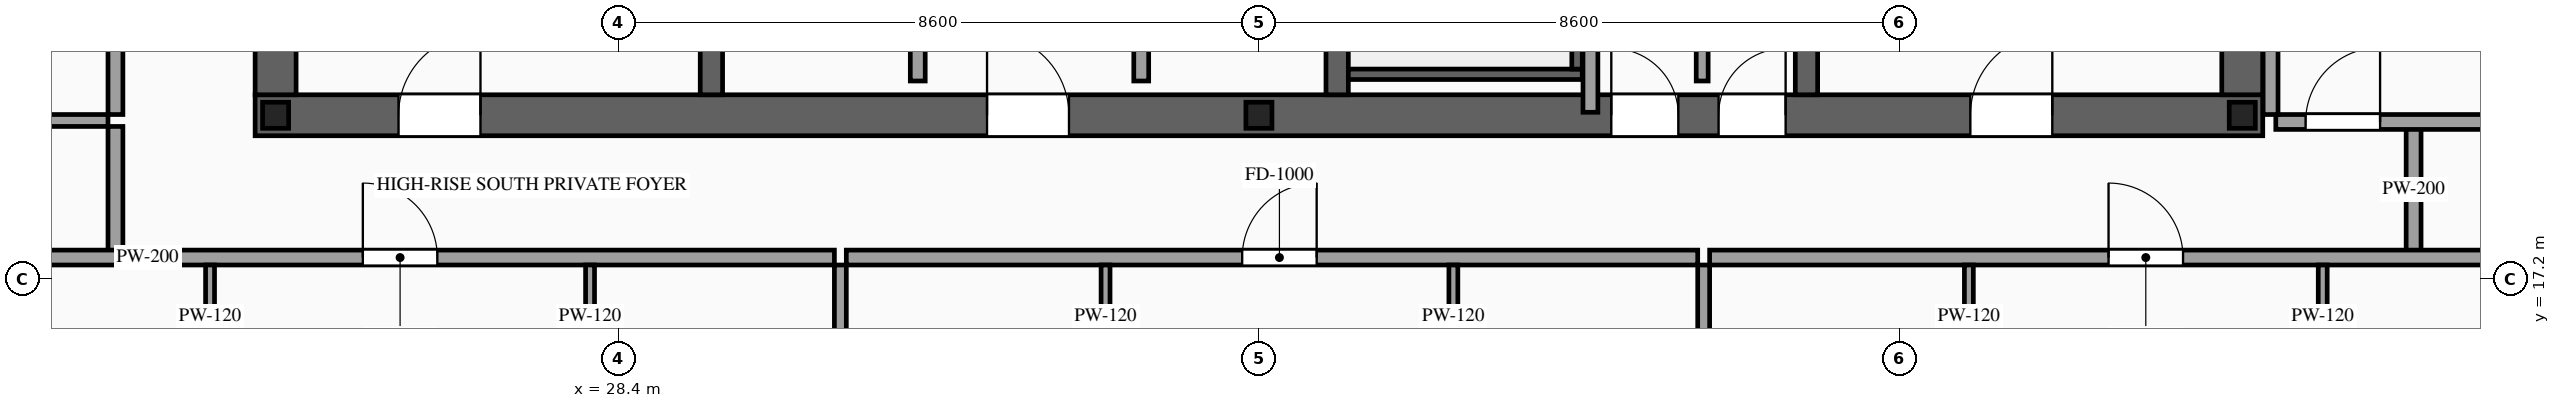
"""IFC4 building model, lengths in metres.
Left out: names, types, materials, properties, quantities, classifications, styles, units other than length and angle.
Written with IfcOpenShell. Run it as: python <this file> out.ifc"""

import sys

from ifc_helpers import new_model, si_unit, direction, frame, frame_2d, origin, origin_2d, place, context, subcontext, project, spatial, rectangle, i_section, extrude, source, transform, mapped, element, fill, save


model = new_model("IFC4")
c1 = context("Model", 3, precision=1e-05, world=origin(), true_north=direction((0.0, 1.0)))
c2 = subcontext(c1, "Body", "Model", "MODEL_VIEW")
j1 = project(units=[si_unit("LENGTHUNIT", "METRE"), si_unit("PLANEANGLEUNIT", "RADIAN")], contexts=[c1])
p1 = place(None, origin())
s1 = spatial("IfcSite", under=j1, at=p1, CompositionType="ELEMENT")
p2 = place(p1, origin())
s2 = spatial("IfcBuilding", under=s1, at=p2, CompositionType="ELEMENT")
p3 = place(p2, frame((0.0, 0.0, 275.1)))
s3 = spatial("IfcBuildingStorey", under=s2, at=p3, CompositionType="ELEMENT", Elevation=275.1)
p4 = place(p3, frame((23.525, 19.4, 0.0), z_axis=(0.0, 0.0, 1.0), x_axis=(1.0, 0.0, 0.0)))
e1 = element("IfcWall", 1, at=p4, inside=s3, PredefinedType="SHEAR", context=c2, shape_type="SweptSolid", body=[
    extrude(rectangle(XDim=26.95, YDim=0.55, at=frame_2d((13.475, 0.0))), origin(), (0.0, 0.0, 1.0), 3.5),
])
p5 = place(p4, frame((1.925, 0.0, 0.0)))
e2 = element("IfcOpeningElement", 2, at=p5, cuts=e1, PredefinedType="OPENING", context=c2, shape_type="SweptSolid", body=[
    extrude(rectangle(XDim=1.1, YDim=2.2, at=frame_2d((0.55, 1.1))), frame((0.0, 0.29, 0.0), z_axis=(0.0, -1.0, 0.0), x_axis=(1.0, 0.0, 0.0)), (0.0, 0.0, 1.0), 0.58),
])
p6 = place(p4, frame((9.825, 0.0, 0.0)))
e3 = element("IfcOpeningElement", 3, at=p6, cuts=e1, PredefinedType="OPENING", context=c2, shape_type="SweptSolid", body=[
    extrude(rectangle(XDim=1.1, YDim=2.2, at=frame_2d((0.55, 1.1))), frame((0.0, 0.29, 0.0), z_axis=(0.0, -1.0, 0.0), x_axis=(1.0, 0.0, 0.0)), (0.0, 0.0, 1.0), 0.58),
])
p7 = place(p4, frame((23.025, 0.0, 0.0)))
e4 = element("IfcOpeningElement", 4, at=p7, cuts=e1, PredefinedType="OPENING", context=c2, shape_type="SweptSolid", body=[
    extrude(rectangle(XDim=1.1, YDim=2.2, at=frame_2d((0.55, 1.1))), frame((0.0, 0.29, 0.0), z_axis=(0.0, -1.0, 0.0), x_axis=(1.0, 0.0, 0.0)), (0.0, 0.0, 1.0), 0.58),
])
p8 = place(p4, frame((19.645, 0.0, 0.0)))
e5 = element("IfcOpeningElement", 5, at=p8, cuts=e1, PredefinedType="OPENING", context=c2, shape_type="SweptSolid", body=[
    extrude(rectangle(XDim=0.9, YDim=2.15, at=frame_2d((0.45, 1.075))), frame((0.0, 0.29, 0.0), z_axis=(0.0, -1.0, 0.0), x_axis=(1.0, 0.0, 0.0)), (0.0, 0.0, 1.0), 0.58),
])
p9 = place(p4, frame((18.205, 0.0, 0.0)))
e6 = element("IfcOpeningElement", 6, at=p9, cuts=e1, PredefinedType="OPENING", context=c2, shape_type="SweptSolid", body=[
    extrude(rectangle(XDim=0.9, YDim=2.15, at=frame_2d((0.45, 1.075))), frame((0.0, 0.29, 0.0), z_axis=(0.0, -1.0, 0.0), x_axis=(1.0, 0.0, 0.0)), (0.0, 0.0, 1.0), 0.58),
])
m1 = source(origin(), c2, "Body", "SweptSolid", [
    extrude(rectangle(XDim=12.25, YDim=0.55, at=frame_2d((6.125, 0.0))), origin(), (0.0, 0.0, 1.0), 3.5),
])
for number, where, z_axis, x_axis in (
    (7, (23.8, 19.675, 0.0), (0.0, 0.0, 1.0), (0.0, 1.0, 0.0)),
    (8, (50.2, 19.675, 0.0), (0.0, 0.0, 1.0), (0.0, 1.0, 0.0)),
):
    element("IfcWall", number, at=place(p3, frame(where, z_axis=z_axis, x_axis=x_axis)), inside=s3, PredefinedType="SHEAR", context=c2, shape_type="MappedRepresentation", body=[
        mapped(m1, transform((0.0, 0.0, 0.0), scale=1.0)),
    ])
m2 = source(origin(), c2, "Body", "SweptSolid", [
    extrude(rectangle(XDim=12.25, YDim=0.3, at=frame_2d((6.125, 0.0))), origin(), (0.0, 0.0, 1.0), 3.5),
])
for number, where, z_axis, x_axis in (
    (9, (29.65, 19.675, 0.0), (0.0, 0.0, 1.0), (0.0, 1.0, 0.0)),
    (10, (38.05, 19.675, 0.0), (0.0, 0.0, 1.0), (0.0, 1.0, 0.0)),
):
    element("IfcWall", number, at=place(p3, frame(where, z_axis=z_axis, x_axis=x_axis)), inside=s3, PredefinedType="SOLIDWALL", context=c2, shape_type="MappedRepresentation", body=[
        mapped(m2, transform((0.0, 0.0, 0.0), scale=1.0)),
    ])
p10 = place(p3, frame((44.35, 19.675, 0.0), z_axis=(0.0, 0.0, 1.0), x_axis=(0.0, 1.0, 0.0)))
e11 = element("IfcWall", 11, at=p10, inside=s3, PredefinedType="SOLIDWALL", context=c2, shape_type="SweptSolid", body=[
    extrude(rectangle(XDim=12.25, YDim=0.3, at=frame_2d((6.125, 0.0))), origin(), (0.0, 0.0, 1.0), 3.5),
])
p11 = place(p10, frame((6.525, 0.0, 0.0)))
e12 = element("IfcOpeningElement", 12, at=p11, cuts=e11, PredefinedType="OPENING", context=c2, shape_type="SweptSolid", body=[
    extrude(rectangle(XDim=1.1, YDim=2.2, at=frame_2d((0.55, 1.1))), frame((0.0, 0.165, 0.0), z_axis=(0.0, -1.0, 0.0), x_axis=(1.0, 0.0, 0.0)), (0.0, 0.0, 1.0), 0.33),
])
p12 = place(p10, frame((8.625, 0.0, 0.0)))
e13 = element("IfcOpeningElement", 13, at=p12, cuts=e11, PredefinedType="OPENING", context=c2, shape_type="SweptSolid", body=[
    extrude(rectangle(XDim=1.1, YDim=2.2, at=frame_2d((0.55, 1.1))), frame((0.0, 0.165, 0.0), z_axis=(0.0, -1.0, 0.0), x_axis=(1.0, 0.0, 0.0)), (0.0, 0.0, 1.0), 0.33),
])
p13 = place(p10, frame((10.725, 0.0, 0.0)))
e14 = element("IfcOpeningElement", 14, at=p13, cuts=e11, PredefinedType="OPENING", context=c2, shape_type="SweptSolid", body=[
    extrude(rectangle(XDim=1.1, YDim=2.2, at=frame_2d((0.55, 1.1))), frame((0.0, 0.165, 0.0), z_axis=(0.0, -1.0, 0.0), x_axis=(1.0, 0.0, 0.0)), (0.0, 0.0, 1.0), 0.33),
])
m3 = source(origin(), c2, "Body", "SweptSolid", [
    extrude(i_section(OverallWidth=0.35, OverallDepth=0.35, WebThickness=0.012, FlangeThickness=0.019, at=origin_2d()), origin(), (0.0, 0.0, 1.0), 3.5),
])
for number, where, z_axis, x_axis in (
    (15, (23.8, 19.4, 0.0), (0.0, 0.0, 1.0), (1.0, 0.0, 0.0)),
    (16, (37.0, 19.4, 0.0), (0.0, 0.0, 1.0), (1.0, 0.0, 0.0)),
    (17, (50.2, 19.4, 0.0), (0.0, 0.0, 1.0), (1.0, 0.0, 0.0)),
):
    element("IfcColumn", number, at=place(p3, frame(where, z_axis=z_axis, x_axis=x_axis)), inside=s3, PredefinedType="COLUMN", context=c2, shape_type="MappedRepresentation", body=[
        mapped(m3, transform((0.0, 0.0, 0.0), scale=1.0)),
    ])
m4 = source(origin(), c2, "Body", "SweptSolid", [
    extrude(rectangle(XDim=3.14, YDim=0.14, at=frame_2d((1.57, 0.0))), origin(), (0.0, 0.0, 1.0), 3.28),
])
p14 = place(p3, frame((38.2, 19.95, 0.0), z_axis=(0.0, 0.0, 1.0), x_axis=(1.0, 0.0, 0.0)))
e18 = element("IfcWall", 18, at=p14, inside=s3, PredefinedType="SOLIDWALL", context=c2, shape_type="MappedRepresentation", body=[
    mapped(m4, transform((0.0, 0.0, 0.0), scale=1.0)),
])
m5 = source(origin(), c2, "Body", "SweptSolid", [
    extrude(rectangle(XDim=8.94, YDim=0.14, at=frame_2d((4.47, 0.0))), origin(), (0.0, 0.0, 1.0), 3.28),
])
p15 = place(p3, frame((41.27, 20.02, 0.0), z_axis=(0.0, 0.0, 1.0), x_axis=(0.0, 1.0, 0.0)))
e19 = element("IfcWall", 19, at=p15, inside=s3, PredefinedType="SOLIDWALL", context=c2, shape_type="MappedRepresentation", body=[
    mapped(m5, transform((0.0, 0.0, 0.0), scale=1.0)),
])
p16 = place(p3, frame((32.42, 19.86, 0.0), z_axis=(0.0, 0.0, 1.0), x_axis=(0.0, 1.0, 0.0)))
e20 = element("IfcWall", 20, at=p16, inside=s3, PredefinedType="PARTITIONING", context=c2, shape_type="SweptSolid", body=[
    extrude(rectangle(XDim=7.94, YDim=0.2, at=frame_2d((3.97, 0.0))), origin(), (0.0, 0.0, 1.0), 3.28),
])
p17 = place(p16, frame((3.52, 0.0, 0.0)))
e21 = element("IfcOpeningElement", 21, at=p17, cuts=e20, PredefinedType="OPENING", context=c2, shape_type="SweptSolid", body=[
    extrude(rectangle(XDim=0.9, YDim=2.15, at=frame_2d((0.45, 1.075))), frame((0.0, 0.115, 0.0), z_axis=(0.0, -1.0, 0.0), x_axis=(1.0, 0.0, 0.0)), (0.0, 0.0, 1.0), 0.23),
])
p18 = place(p3, frame((35.42, 19.86, 0.0), z_axis=(0.0, 0.0, 1.0), x_axis=(0.0, 1.0, 0.0)))
e22 = element("IfcWall", 22, at=p18, inside=s3, PredefinedType="PARTITIONING", context=c2, shape_type="SweptSolid", body=[
    extrude(rectangle(XDim=6.34, YDim=0.2, at=frame_2d((3.17, 0.0))), origin(), (0.0, 0.0, 1.0), 3.28),
])
p19 = place(p18, frame((2.72, 0.0, 0.0)))
e23 = element("IfcOpeningElement", 23, at=p19, cuts=e22, PredefinedType="OPENING", context=c2, shape_type="SweptSolid", body=[
    extrude(rectangle(XDim=0.9, YDim=2.15, at=frame_2d((0.45, 1.075))), frame((0.0, 0.115, 0.0), z_axis=(0.0, -1.0, 0.0), x_axis=(1.0, 0.0, 0.0)), (0.0, 0.0, 1.0), 0.23),
])
m6 = source(origin(), c2, "Body", "SweptSolid", [
    extrude(rectangle(XDim=1.34, YDim=0.16, at=frame_2d((0.67, 0.0))), origin(), (0.0, 0.0, 1.0), 3.28),
])
p20 = place(p3, frame((42.95, 19.86, 0.0), z_axis=(0.0, 0.0, 1.0), x_axis=(0.0, 1.0, 0.0)))
e24 = element("IfcWall", 24, at=p20, inside=s3, PredefinedType="PARTITIONING", context=c2, shape_type="MappedRepresentation", body=[
    mapped(m6, transform((0.0, 0.0, 0.0), scale=1.0)),
])
m7 = source(origin(), c2, "Body", "SweptSolid", [
    extrude(rectangle(XDim=6.06, YDim=0.2, at=frame_2d((3.03, 0.0))), origin(), (0.0, 0.0, 1.0), 3.28),
])
p21 = place(p3, frame((41.45, 19.44, 0.0), z_axis=(0.0, 0.0, 1.0), x_axis=(0.0, 1.0, 0.0)))
e25 = element("IfcWall", 25, at=p21, inside=s3, PredefinedType="PARTITIONING", context=c2, shape_type="MappedRepresentation", body=[
    mapped(m7, transform((0.0, 0.0, 0.0), scale=1.0)),
])
m8 = source(origin(), c2, "Body", "SweptSolid", [
    extrude(rectangle(XDim=1.7, YDim=0.2, at=frame_2d((0.85, 0.0))), origin(), (0.0, 0.0, 1.0), 3.28),
])
for number, where, z_axis, x_axis in (
    (26, (21.65, 17.55, 0.0), (0.0, 0.0, 1.0), (0.0, 1.0, 0.0)),
    (27, (52.5, 17.55, 0.0), (0.0, 0.0, 1.0), (0.0, 1.0, 0.0)),
):
    element("IfcWall", number, at=place(p3, frame(where, z_axis=z_axis, x_axis=x_axis)), inside=s3, PredefinedType="PARTITIONING", context=c2, shape_type="MappedRepresentation", body=[
        mapped(m8, transform((0.0, 0.0, 0.0), scale=1.0)),
    ])
p22 = place(p3, frame((19.44, 17.49, 0.0), z_axis=(0.0, 0.0, 1.0), x_axis=(1.0, 0.0, 0.0)))
e28 = element("IfcWall", 28, at=p22, inside=s3, PredefinedType="PARTITIONING", context=c2, shape_type="SweptSolid", body=[
    extrude(rectangle(XDim=11.861, YDim=0.2, at=frame_2d((5.931, 0.0))), origin(), (0.0, 0.0, 1.0), 3.28),
])
p23 = place(p22, frame((5.531, 0.0, 0.0)))
e29 = element("IfcOpeningElement", 29, at=p23, cuts=e28, PredefinedType="OPENING", context=c2, shape_type="SweptSolid", body=[
    extrude(rectangle(XDim=1.0, YDim=2.2, at=frame_2d((0.5, 1.1))), frame((0.0, 0.115, 0.0), z_axis=(0.0, -1.0, 0.0), x_axis=(1.0, 0.0, 0.0)), (0.0, 0.0, 1.0), 0.23),
])
m9 = source(origin(), c2, "Body", "SweptSolid", [
    extrude(rectangle(XDim=12.04, YDim=0.16, at=frame_2d((6.02, 0.0))), origin(), (0.0, 0.0, 1.0), 3.28),
])
p24 = place(p3, frame((31.381, 5.35, 0.0), z_axis=(0.0, 0.0, 1.0), x_axis=(0.0, 1.0, 0.0)))
e30 = element("IfcWall", 30, at=p24, inside=s3, PredefinedType="PARTITIONING", context=c2, shape_type="MappedRepresentation", body=[
    mapped(m9, transform((0.0, 0.0, 0.0), scale=1.0)),
])
p25 = place(p3, frame((22.92, 13.28, 0.0), z_axis=(0.0, 0.0, 1.0), x_axis=(0.0, 1.0, 0.0)))
e31 = element("IfcWall", 31, at=p25, inside=s3, PredefinedType="PARTITIONING", context=c2, shape_type="SweptSolid", body=[
    extrude(rectangle(XDim=4.11, YDim=0.12, at=frame_2d((2.055, 0.0))), origin(), (0.0, 0.0, 1.0), 3.28),
])
p26 = place(p25, frame((1.63, 0.0, 0.0)))
e32 = element("IfcOpeningElement", 32, at=p26, cuts=e31, PredefinedType="OPENING", context=c2, shape_type="SweptSolid", body=[
    extrude(rectangle(XDim=0.85, YDim=2.1, at=frame_2d((0.425, 1.05))), frame((0.0, 0.075, 0.0), z_axis=(0.0, -1.0, 0.0), x_axis=(1.0, 0.0, 0.0)), (0.0, 0.0, 1.0), 0.15),
])
p27 = place(p3, frame((28.021, 13.28, 0.0), z_axis=(0.0, 0.0, 1.0), x_axis=(0.0, 1.0, 0.0)))
e33 = element("IfcWall", 33, at=p27, inside=s3, PredefinedType="PARTITIONING", context=c2, shape_type="SweptSolid", body=[
    extrude(rectangle(XDim=4.11, YDim=0.12, at=frame_2d((2.055, 0.0))), origin(), (0.0, 0.0, 1.0), 3.28),
])
p28 = place(p27, frame((1.63, 0.0, 0.0)))
e34 = element("IfcOpeningElement", 34, at=p28, cuts=e33, PredefinedType="OPENING", context=c2, shape_type="SweptSolid", body=[
    extrude(rectangle(XDim=0.85, YDim=2.1, at=frame_2d((0.425, 1.05))), frame((0.0, 0.075, 0.0), z_axis=(0.0, -1.0, 0.0), x_axis=(1.0, 0.0, 0.0)), (0.0, 0.0, 1.0), 0.15),
])
p29 = place(p3, frame((31.461, 17.49, 0.0), z_axis=(0.0, 0.0, 1.0), x_axis=(1.0, 0.0, 0.0)))
e35 = element("IfcWall", 35, at=p29, inside=s3, PredefinedType="PARTITIONING", context=c2, shape_type="SweptSolid", body=[
    extrude(rectangle(XDim=11.429, YDim=0.2, at=frame_2d((5.714, 0.0))), origin(), (0.0, 0.0, 1.0), 3.28),
])
p30 = place(p29, frame((5.314, 0.0, 0.0)))
e36 = element("IfcOpeningElement", 36, at=p30, cuts=e35, PredefinedType="OPENING", context=c2, shape_type="SweptSolid", body=[
    extrude(rectangle(XDim=1.0, YDim=2.2, at=frame_2d((0.5, 1.1))), frame((0.0, 0.115, 0.0), z_axis=(0.0, -1.0, 0.0), x_axis=(1.0, 0.0, 0.0)), (0.0, 0.0, 1.0), 0.23),
])
p31 = place(p3, frame((42.97, 5.35, 0.0), z_axis=(0.0, 0.0, 1.0), x_axis=(0.0, 1.0, 0.0)))
e37 = element("IfcWall", 37, at=p31, inside=s3, PredefinedType="PARTITIONING", context=c2, shape_type="MappedRepresentation", body=[
    mapped(m9, transform((0.0, 0.0, 0.0), scale=1.0)),
])
p32 = place(p3, frame((34.941, 13.28, 0.0), z_axis=(0.0, 0.0, 1.0), x_axis=(0.0, 1.0, 0.0)))
e38 = element("IfcWall", 38, at=p32, inside=s3, PredefinedType="PARTITIONING", context=c2, shape_type="SweptSolid", body=[
    extrude(rectangle(XDim=4.11, YDim=0.12, at=frame_2d((2.055, 0.0))), origin(), (0.0, 0.0, 1.0), 3.28),
])
p33 = place(p32, frame((1.63, 0.0, 0.0)))
e39 = element("IfcOpeningElement", 39, at=p33, cuts=e38, PredefinedType="OPENING", context=c2, shape_type="SweptSolid", body=[
    extrude(rectangle(XDim=0.85, YDim=2.1, at=frame_2d((0.425, 1.05))), frame((0.0, 0.075, 0.0), z_axis=(0.0, -1.0, 0.0), x_axis=(1.0, 0.0, 0.0)), (0.0, 0.0, 1.0), 0.15),
])
p34 = place(p3, frame((39.61, 13.28, 0.0), z_axis=(0.0, 0.0, 1.0), x_axis=(0.0, 1.0, 0.0)))
e40 = element("IfcWall", 40, at=p34, inside=s3, PredefinedType="PARTITIONING", context=c2, shape_type="SweptSolid", body=[
    extrude(rectangle(XDim=4.11, YDim=0.12, at=frame_2d((2.055, 0.0))), origin(), (0.0, 0.0, 1.0), 3.28),
])
p35 = place(p34, frame((1.63, 0.0, 0.0)))
e41 = element("IfcOpeningElement", 41, at=p35, cuts=e40, PredefinedType="OPENING", context=c2, shape_type="SweptSolid", body=[
    extrude(rectangle(XDim=0.85, YDim=2.1, at=frame_2d((0.425, 1.05))), frame((0.0, 0.075, 0.0), z_axis=(0.0, -1.0, 0.0), x_axis=(1.0, 0.0, 0.0)), (0.0, 0.0, 1.0), 0.15),
])
p36 = place(p3, frame((43.05, 17.49, 0.0), z_axis=(0.0, 0.0, 1.0), x_axis=(1.0, 0.0, 0.0)))
e42 = element("IfcWall", 42, at=p36, inside=s3, PredefinedType="PARTITIONING", context=c2, shape_type="SweptSolid", body=[
    extrude(rectangle(XDim=11.51, YDim=0.2, at=frame_2d((5.755, 0.0))), origin(), (0.0, 0.0, 1.0), 3.28),
])
p37 = place(p36, frame((5.355, 0.0, 0.0)))
e43 = element("IfcOpeningElement", 43, at=p37, cuts=e42, PredefinedType="OPENING", context=c2, shape_type="SweptSolid", body=[
    extrude(rectangle(XDim=1.0, YDim=2.2, at=frame_2d((0.5, 1.1))), frame((0.0, 0.115, 0.0), z_axis=(0.0, -1.0, 0.0), x_axis=(1.0, 0.0, 0.0)), (0.0, 0.0, 1.0), 0.23),
])
p38 = place(p3, frame((46.53, 13.28, 0.0), z_axis=(0.0, 0.0, 1.0), x_axis=(0.0, 1.0, 0.0)))
e44 = element("IfcWall", 44, at=p38, inside=s3, PredefinedType="PARTITIONING", context=c2, shape_type="SweptSolid", body=[
    extrude(rectangle(XDim=4.11, YDim=0.12, at=frame_2d((2.055, 0.0))), origin(), (0.0, 0.0, 1.0), 3.28),
])
p39 = place(p38, frame((1.63, 0.0, 0.0)))
e45 = element("IfcOpeningElement", 45, at=p39, cuts=e44, PredefinedType="OPENING", context=c2, shape_type="SweptSolid", body=[
    extrude(rectangle(XDim=0.85, YDim=2.1, at=frame_2d((0.425, 1.05))), frame((0.0, 0.075, 0.0), z_axis=(0.0, -1.0, 0.0), x_axis=(1.0, 0.0, 0.0)), (0.0, 0.0, 1.0), 0.15),
])
p40 = place(p3, frame((51.28, 13.28, 0.0), z_axis=(0.0, 0.0, 1.0), x_axis=(0.0, 1.0, 0.0)))
e46 = element("IfcWall", 46, at=p40, inside=s3, PredefinedType="PARTITIONING", context=c2, shape_type="SweptSolid", body=[
    extrude(rectangle(XDim=4.11, YDim=0.12, at=frame_2d((2.055, 0.0))), origin(), (0.0, 0.0, 1.0), 3.28),
])
p41 = place(p40, frame((1.63, 0.0, 0.0)))
e47 = element("IfcOpeningElement", 47, at=p41, cuts=e46, PredefinedType="OPENING", context=c2, shape_type="SweptSolid", body=[
    extrude(rectangle(XDim=0.85, YDim=2.1, at=frame_2d((0.425, 1.05))), frame((0.0, 0.075, 0.0), z_axis=(0.0, -1.0, 0.0), x_axis=(1.0, 0.0, 0.0)), (0.0, 0.0, 1.0), 0.15),
])
p42 = place(p3, frame((21.65, 19.41, 0.0), z_axis=(0.0, 0.0, 1.0), x_axis=(0.0, 1.0, 0.0)))
e48 = element("IfcWall", 48, at=p42, inside=s3, PredefinedType="PARTITIONING", context=c2, shape_type="SweptSolid", body=[
    extrude(rectangle(XDim=12.78, YDim=0.2, at=frame_2d((6.39, 0.0))), origin(), (0.0, 0.0, 1.0), 3.28),
])
p43 = place(p42, frame((5.89, 0.0, 0.0)))
e49 = element("IfcOpeningElement", 49, at=p43, cuts=e48, PredefinedType="OPENING", context=c2, shape_type="SweptSolid", body=[
    extrude(rectangle(XDim=1.0, YDim=2.2, at=frame_2d((0.5, 1.1))), frame((0.0, 0.115, 0.0), z_axis=(0.0, -1.0, 0.0), x_axis=(1.0, 0.0, 0.0)), (0.0, 0.0, 1.0), 0.23),
])
m10 = source(origin(), c2, "Body", "SweptSolid", [
    extrude(rectangle(XDim=5.0, YDim=0.16, at=frame_2d((2.5, 0.0))), origin(), (0.0, 0.0, 1.0), 2.825),
])
p44 = place(p3, frame((16.55, 19.33, 0.0), z_axis=(0.0, 0.0, 1.0), x_axis=(1.0, 0.0, 0.0)))
e50 = element("IfcWall", 50, at=p44, inside=s3, PredefinedType="PARTITIONING", context=c2, shape_type="MappedRepresentation", body=[
    mapped(m10, transform((0.0, 0.0, 0.0), scale=1.0)),
])
p45 = place(p3, frame((50.65, 19.31, 0.0), z_axis=(0.0, 0.0, 1.0), x_axis=(1.0, 0.0, 0.0)))
e51 = element("IfcWall", 51, at=p45, inside=s3, PredefinedType="PARTITIONING", context=c2, shape_type="SweptSolid", body=[
    extrude(rectangle(XDim=6.8, YDim=0.2, at=frame_2d((3.4, 0.0))), origin(), (0.0, 0.0, 1.0), 2.825),
])
p46 = place(p45, frame((0.4, 0.0, 0.0)))
e52 = element("IfcOpeningElement", 52, at=p46, cuts=e51, PredefinedType="OPENING", context=c2, shape_type="SweptSolid", body=[
    extrude(rectangle(XDim=1.0, YDim=2.2, at=frame_2d((0.5, 1.1))), frame((0.0, 0.115, 0.0), z_axis=(0.0, -1.0, 0.0), x_axis=(1.0, 0.0, 0.0)), (0.0, 0.0, 1.0), 0.23),
])
m11 = source(origin(), c2, "Body", "SweptSolid", [
    extrude(rectangle(XDim=12.78, YDim=0.2, at=frame_2d((6.39, 0.0))), origin(), (0.0, 0.0, 1.0), 3.28),
])
p47 = place(p3, frame((50.58, 19.41, 0.0), z_axis=(0.0, 0.0, 1.0), x_axis=(0.0, 1.0, 0.0)))
e53 = element("IfcWall", 53, at=p47, inside=s3, PredefinedType="PARTITIONING", context=c2, shape_type="MappedRepresentation", body=[
    mapped(m11, transform((0.0, 0.0, 0.0), scale=1.0)),
])
m12 = source(origin(), c2, "Body", "SweptSolid", [
    extrude(rectangle(XDim=1.1, YDim=2.2, at=frame_2d((0.55, 1.1))), frame((0.0, 0.025, 0.0), z_axis=(0.0, -1.0, 0.0), x_axis=(1.0, 0.0, 0.0)), (0.0, 0.0, 1.0), 0.05),
])
p48 = place(p5, origin())
e54 = element("IfcDoor", 54, at=p48, inside=s3, OperationType="SINGLE_SWING_RIGHT", PredefinedType="DOOR", context=c2, shape_type="MappedRepresentation", body=[
    mapped(m12, transform((0.0, 0.0, 0.0), scale=1.0)),
])
fill(e2, e54)
p49 = place(p6, origin())
e55 = element("IfcDoor", 55, at=p49, inside=s3, OperationType="SINGLE_SWING_LEFT", PredefinedType="DOOR", context=c2, shape_type="MappedRepresentation", body=[
    mapped(m12, transform((0.0, 0.0, 0.0), scale=1.0)),
])
fill(e3, e55)
p50 = place(p7, origin())
e56 = element("IfcDoor", 56, at=p50, inside=s3, OperationType="SINGLE_SWING_RIGHT", PredefinedType="DOOR", context=c2, shape_type="MappedRepresentation", body=[
    mapped(m12, transform((0.0, 0.0, 0.0), scale=1.0)),
])
fill(e4, e56)
m13 = source(origin(), c2, "Body", "SweptSolid", [
    extrude(rectangle(XDim=0.9, YDim=2.15, at=frame_2d((0.45, 1.075))), frame((0.0, 0.025, 0.0), z_axis=(0.0, -1.0, 0.0), x_axis=(1.0, 0.0, 0.0)), (0.0, 0.0, 1.0), 0.05),
])
p51 = place(p8, origin())
e57 = element("IfcDoor", 57, at=p51, inside=s3, OperationType="SINGLE_SWING_RIGHT", PredefinedType="DOOR", context=c2, shape_type="MappedRepresentation", body=[
    mapped(m13, transform((0.0, 0.0, 0.0), scale=1.0)),
])
fill(e5, e57)
p52 = place(p9, origin())
e58 = element("IfcDoor", 58, at=p52, inside=s3, OperationType="SINGLE_SWING_LEFT", PredefinedType="DOOR", context=c2, shape_type="MappedRepresentation", body=[
    mapped(m13, transform((0.0, 0.0, 0.0), scale=1.0)),
])
fill(e6, e58)
m14 = source(origin(), c2, "Body", "SweptSolid", [
    extrude(rectangle(XDim=1.0, YDim=2.2, at=frame_2d((0.5, 1.1))), frame((0.0, 0.025, 0.0), z_axis=(0.0, -1.0, 0.0), x_axis=(1.0, 0.0, 0.0)), (0.0, 0.0, 1.0), 0.05),
])
p53 = place(p23, origin())
e59 = element("IfcDoor", 59, at=p53, inside=s3, OperationType="SINGLE_SWING_LEFT", PredefinedType="DOOR", context=c2, shape_type="MappedRepresentation", body=[
    mapped(m14, transform((0.0, 0.0, 0.0), scale=1.0)),
])
fill(e29, e59)
p54 = place(p30, origin())
e60 = element("IfcDoor", 60, at=p54, inside=s3, OperationType="SINGLE_SWING_RIGHT", PredefinedType="DOOR", context=c2, shape_type="MappedRepresentation", body=[
    mapped(m14, transform((0.0, 0.0, 0.0), scale=1.0)),
])
fill(e36, e60)
p55 = place(p37, origin())
e61 = element("IfcDoor", 61, at=p55, inside=s3, OperationType="SINGLE_SWING_LEFT", PredefinedType="DOOR", context=c2, shape_type="MappedRepresentation", body=[
    mapped(m14, transform((0.0, 0.0, 0.0), scale=1.0)),
])
fill(e43, e61)
p56 = place(p46, origin())
e62 = element("IfcDoor", 62, at=p56, inside=s3, OperationType="SINGLE_SWING_RIGHT", PredefinedType="DOOR", context=c2, shape_type="MappedRepresentation", body=[
    mapped(m14, transform((0.0, 0.0, 0.0), scale=1.0)),
])
fill(e52, e62)
save(model, sys.argv[1])
